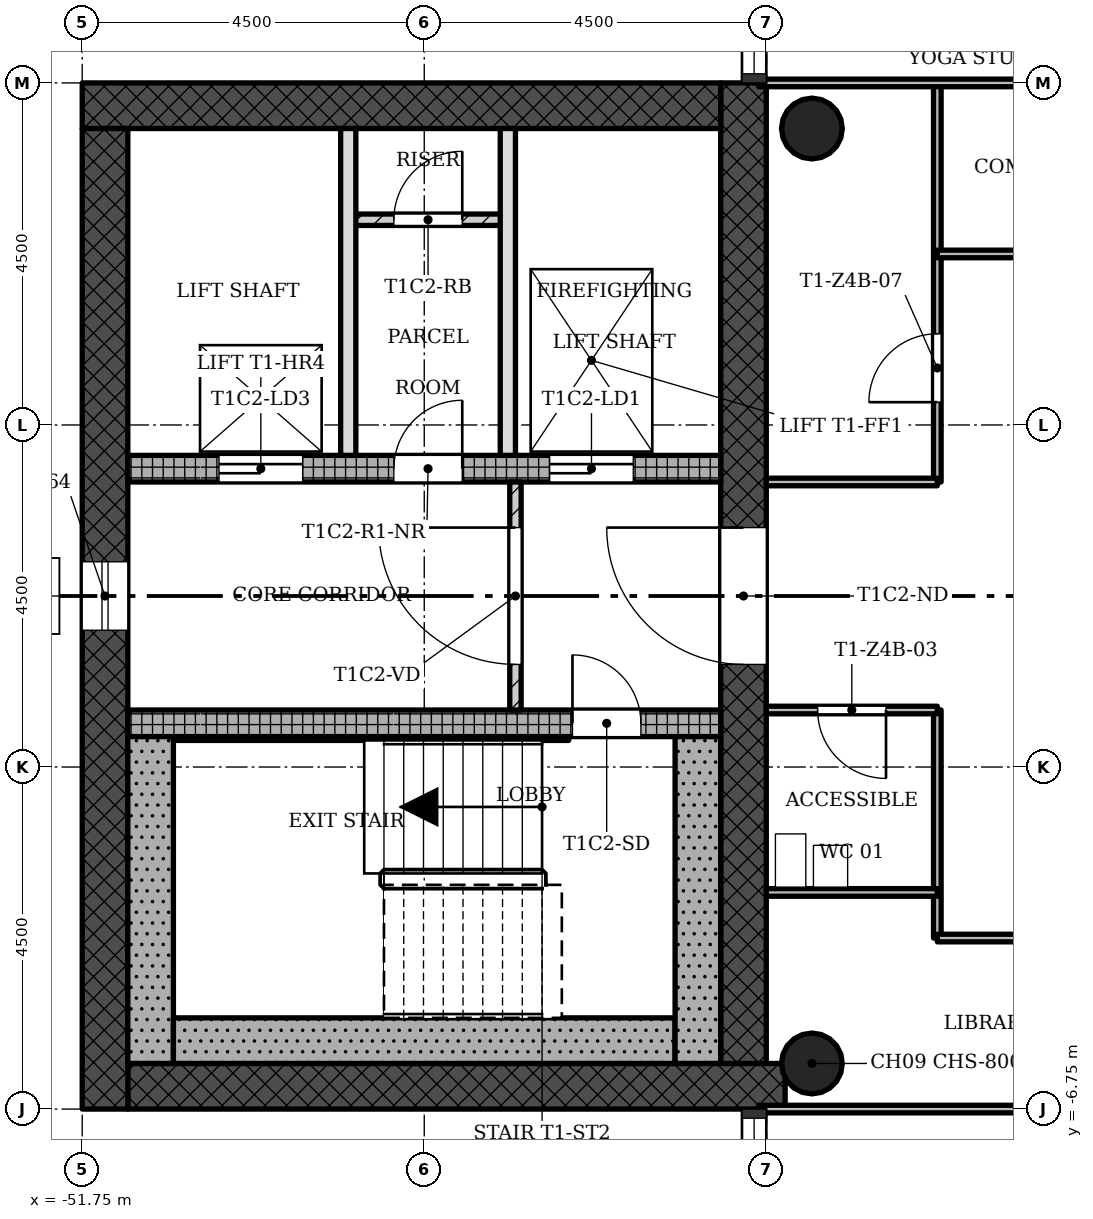
"""IFC4 building model, lengths in metres.
Left out: names, types, materials, properties, quantities, classifications, styles, units other than length and angle.
Written with IfcOpenShell. Run it as: python <this file> out.ifc"""

import sys

from ifc_helpers import new_model, si_unit, direction, frame, frame_2d, origin, origin_2d, place, context, subcontext, project, spatial, rectangle, hollow_circle, extrude, element, fill, save


model = new_model("IFC4")
c1 = context("Model", 3, precision=1e-05, world=origin(), true_north=direction((0.0, 1.0)))
c2 = subcontext(c1, "Body", "Model", "MODEL_VIEW")
j1 = project(units=[si_unit("LENGTHUNIT", "METRE"), si_unit("PLANEANGLEUNIT", "RADIAN")], contexts=[c1])
p1 = place(None, origin())
s1 = spatial("IfcSite", under=j1, at=p1, CompositionType="ELEMENT")
p2 = place(p1, origin())
s2 = spatial("IfcBuilding", under=s1, at=p2, CompositionType="ELEMENT")
p3 = place(p2, frame((0.0, 0.0, 230.0)))
s3 = spatial("IfcBuildingStorey", under=s2, at=p3, CompositionType="ELEMENT", Elevation=230.0)
p4 = place(p3, frame((-51.15, -6.45, 0.0), z_axis=(0.0, 0.0, 1.0), x_axis=(1.0, 0.0, 0.0)))
e1 = element("IfcWall", 1, at=p4, inside=s3, PredefinedType="SHEAR", context=c2, shape_type="SweptSolid", body=[
    extrude(rectangle(XDim=8.648, YDim=0.6, at=frame_2d((4.324, 0.0))), origin(), (0.0, 0.0, 1.0), 3.4),
])
p5 = place(p3, frame((-43.05, -6.15, 0.0), z_axis=(0.0, 0.0, 1.0), x_axis=(0.0, 1.0, 0.0)))
e2 = element("IfcWall", 2, at=p5, inside=s3, PredefinedType="SHEAR", context=c2, shape_type="SweptSolid", body=[
    extrude(rectangle(XDim=12.9, YDim=0.6, at=frame_2d((6.45, 0.0))), origin(), (0.0, 0.0, 1.0), 3.4),
])
p6 = place(p5, frame((5.25, 0.0, 0.0)))
e3 = element("IfcOpeningElement", 3, at=p6, cuts=e2, PredefinedType="OPENING", context=c2, shape_type="SweptSolid", body=[
    extrude(rectangle(XDim=1.8, YDim=2.1, at=frame_2d((0.9, 1.05))), frame((0.0, 0.31, 0.0), z_axis=(0.0, -1.0, 0.0), x_axis=(1.0, 0.0, 0.0)), (0.0, 0.0, 1.0), 0.62),
])
p7 = place(p3, frame((-43.35, 6.45, 0.0), z_axis=(0.0, 0.0, 1.0), x_axis=(-1.0, 0.0, 0.0)))
e4 = element("IfcWall", 4, at=p7, inside=s3, PredefinedType="SHEAR", context=c2, shape_type="SweptSolid", body=[
    extrude(rectangle(XDim=8.4, YDim=0.6, at=frame_2d((4.2, 0.0))), origin(), (0.0, 0.0, 1.0), 3.4),
])
p8 = place(p3, frame((-51.45, 6.15, 0.0), z_axis=(0.0, 0.0, 1.0), x_axis=(0.0, -1.0, 0.0)))
e5 = element("IfcWall", 5, at=p8, inside=s3, PredefinedType="SHEAR", context=c2, shape_type="SweptSolid", body=[
    extrude(rectangle(XDim=12.9, YDim=0.6, at=frame_2d((6.45, 0.0))), origin(), (0.0, 0.0, 1.0), 3.4),
])
p9 = place(p8, frame((5.7, 0.0, 0.45)))
e6 = element("IfcOpeningElement", 6, at=p9, cuts=e5, PredefinedType="OPENING", context=c2, shape_type="SweptSolid", body=[
    extrude(rectangle(XDim=0.9, YDim=2.4, at=frame_2d((0.45, 1.2))), frame((0.0, 0.31, 0.0), z_axis=(0.0, -1.0, 0.0), x_axis=(1.0, 0.0, 0.0)), (0.0, 0.0, 1.0), 0.62),
])
p10 = place(p3, frame((-51.15, -1.675, 0.0), z_axis=(0.0, 0.0, 1.0), x_axis=(1.0, 0.0, 0.0)))
e7 = element("IfcWall", 7, at=p10, inside=s3, PredefinedType="SHEAR", context=c2, shape_type="SweptSolid", body=[
    extrude(rectangle(XDim=7.8, YDim=0.35, at=frame_2d((3.9, 0.0))), origin(), (0.0, 0.0, 1.0), 3.4),
])
p11 = place(p10, frame((5.85, 0.0, 0.0)))
e8 = element("IfcOpeningElement", 8, at=p11, cuts=e7, PredefinedType="OPENING", context=c2, shape_type="SweptSolid", body=[
    extrude(rectangle(XDim=0.9, YDim=2.1, at=frame_2d((0.45, 1.05))), frame((0.0, 0.185, 0.0), z_axis=(0.0, -1.0, 0.0), x_axis=(1.0, 0.0, 0.0)), (0.0, 0.0, 1.0), 0.37),
])
p12 = place(p3, frame((-51.15, 1.675, 0.0), z_axis=(0.0, 0.0, 1.0), x_axis=(1.0, 0.0, 0.0)))
e9 = element("IfcWall", 9, at=p12, inside=s3, PredefinedType="SHEAR", context=c2, shape_type="SweptSolid", body=[
    extrude(rectangle(XDim=7.8, YDim=0.35, at=frame_2d((3.9, 0.0))), origin(), (0.0, 0.0, 1.0), 3.4),
])
p13 = place(p12, frame((5.55, 0.0, 0.0)))
e10 = element("IfcOpeningElement", 10, at=p13, cuts=e9, PredefinedType="OPENING", context=c2, shape_type="SweptSolid", body=[
    extrude(rectangle(XDim=1.1, YDim=2.1, at=frame_2d((0.55, 1.05))), frame((0.0, 0.185, 0.0), z_axis=(0.0, -1.0, 0.0), x_axis=(1.0, 0.0, 0.0)), (0.0, 0.0, 1.0), 0.37),
])
p14 = place(p12, frame((1.2, 0.0, 0.0)))
e11 = element("IfcOpeningElement", 11, at=p14, cuts=e9, PredefinedType="OPENING", context=c2, shape_type="SweptSolid", body=[
    extrude(rectangle(XDim=1.1, YDim=2.1, at=frame_2d((0.55, 1.05))), frame((0.0, 0.185, 0.0), z_axis=(0.0, -1.0, 0.0), x_axis=(1.0, 0.0, 0.0)), (0.0, 0.0, 1.0), 0.37),
])
p15 = place(p12, frame((3.5, 0.0, 0.0)))
e12 = element("IfcOpeningElement", 12, at=p15, cuts=e9, PredefinedType="OPENING", context=c2, shape_type="SweptSolid", body=[
    extrude(rectangle(XDim=0.9, YDim=2.1, at=frame_2d((0.45, 1.05))), frame((0.0, 0.185, 0.0), z_axis=(0.0, -1.0, 0.0), x_axis=(1.0, 0.0, 0.0)), (0.0, 0.0, 1.0), 0.37),
])
for number, where, z_axis, x_axis in (
    (13, (-42.15, -6.15, 0.0), (0.0, 0.0, 1.0), (1.0, 0.0, 0.0)),
    (14, (-42.15, 6.15, 0.0), (0.0, 0.0, 1.0), (1.0, 0.0, 0.0)),
):
    element("IfcColumn", number, at=place(p3, frame(where, z_axis=z_axis, x_axis=x_axis)), inside=s3, PredefinedType="COLUMN", context=c2, shape_type="SweptSolid", body=[
        extrude(hollow_circle(Radius=0.4, WallThickness=0.028, at=origin_2d()), origin(), (0.0, 0.0, 1.0), 3.4),
    ])
p16 = place(p3, frame((-46.05, 1.5, 0.0), z_axis=(0.0, 0.0, 1.0), x_axis=(0.0, -1.0, 0.0)))
e15 = element("IfcWall", 15, at=p16, inside=s3, PredefinedType="PARTITIONING", context=c2, shape_type="SweptSolid", body=[
    extrude(rectangle(XDim=3.0, YDim=0.15, at=frame_2d((1.5, 0.0))), origin(), (0.0, 0.0, 1.0), 2.98),
])
p17 = place(p16, frame((0.6, 0.0, 0.0)))
e16 = element("IfcOpeningElement", 16, at=p17, cuts=e15, PredefinedType="OPENING", context=c2, shape_type="SweptSolid", body=[
    extrude(rectangle(XDim=1.8, YDim=2.1, at=frame_2d((0.9, 1.05))), frame((0.0, 0.085, 0.0), z_axis=(0.0, -1.0, 0.0), x_axis=(1.0, 0.0, 0.0)), (0.0, 0.0, 1.0), 0.17),
])
for number, where, z_axis, x_axis in (
    (17, (-48.25, 6.15, 0.0), (0.0, 0.0, 1.0), (0.0, -1.0, 0.0)),
    (18, (-46.15, 6.15, 0.0), (0.0, 0.0, 1.0), (0.0, -1.0, 0.0)),
):
    element("IfcWall", number, at=place(p3, frame(where, z_axis=z_axis, x_axis=x_axis)), inside=s3, PredefinedType="SOLIDWALL", context=c2, shape_type="SweptSolid", body=[
        extrude(rectangle(XDim=4.3, YDim=0.2, at=frame_2d((2.15, 0.0))), origin(), (0.0, 0.0, 1.0), 2.98),
    ])
p18 = place(p3, frame((-46.15, 4.95, 0.0), z_axis=(0.0, 0.0, 1.0), x_axis=(-1.0, 0.0, 0.0)))
e19 = element("IfcWall", 19, at=p18, inside=s3, PredefinedType="PARTITIONING", context=c2, shape_type="SweptSolid", body=[
    extrude(rectangle(XDim=2.1, YDim=0.15, at=frame_2d((1.05, 0.0))), origin(), (0.0, 0.0, 1.0), 2.98),
])
p19 = place(p18, frame((0.6, 0.0, 0.0)))
e20 = element("IfcOpeningElement", 20, at=p19, cuts=e19, PredefinedType="OPENING", context=c2, shape_type="SweptSolid", body=[
    extrude(rectangle(XDim=0.9, YDim=2.1, at=frame_2d((0.45, 1.05))), frame((0.0, 0.085, 0.0), z_axis=(0.0, -1.0, 0.0), x_axis=(1.0, 0.0, 0.0)), (0.0, 0.0, 1.0), 0.17),
])
p20 = place(p3, frame((-40.5, -4.5, 0.0), z_axis=(0.0, 0.0, 1.0), x_axis=(0.0, 1.0, 0.0)))
e21 = element("IfcWall", 21, at=p20, inside=s3, PredefinedType="PARTITIONING", context=c2, shape_type="SweptSolid", body=[
    extrude(rectangle(XDim=3.0, YDim=0.1, at=frame_2d((1.5, 0.0))), origin(), (0.0, 0.0, 1.0), 2.98),
])
p21 = place(p3, frame((-40.5, 1.5, 0.0), z_axis=(0.0, 0.0, 1.0), x_axis=(0.0, 1.0, 0.0)))
e22 = element("IfcWall", 22, at=p21, inside=s3, PredefinedType="PARTITIONING", context=c2, shape_type="SweptSolid", body=[
    extrude(rectangle(XDim=5.25, YDim=0.1, at=frame_2d((2.625, 0.0))), origin(), (0.0, 0.0, 1.0), 2.98),
])
p22 = place(p21, frame((1.05, 0.0, 0.0)))
e23 = element("IfcOpeningElement", 23, at=p22, cuts=e22, PredefinedType="OPENING", context=c2, shape_type="SweptSolid", body=[
    extrude(rectangle(XDim=0.9, YDim=2.1, at=frame_2d((0.45, 1.05))), frame((0.0, 0.06, 0.0), z_axis=(0.0, -1.0, 0.0), x_axis=(1.0, 0.0, 0.0)), (0.0, 0.0, 1.0), 0.12),
])
p23 = place(p3, frame((-42.85, -6.75, 0.0), z_axis=(0.0, 0.0, 1.0), x_axis=(1.0, 0.0, 0.0)))
e24 = element("IfcWall", 24, at=p23, inside=s3, PredefinedType="PARTITIONING", context=c2, shape_type="SweptSolid", body=[
    extrude(rectangle(XDim=5.95, YDim=0.1, at=frame_2d((2.975, 0.0))), origin(), (0.0, 0.0, 1.0), 2.98),
])
p24 = place(p3, frame((-40.5, -4.5, 0.0), z_axis=(0.0, 0.0, 1.0), x_axis=(1.0, 0.0, 0.0)))
e25 = element("IfcWall", 25, at=p24, inside=s3, PredefinedType="PARTITIONING", context=c2, shape_type="SweptSolid", body=[
    extrude(rectangle(XDim=3.6, YDim=0.1, at=frame_2d((1.8, 0.0))), origin(), (0.0, 0.0, 1.0), 2.98),
])
p25 = place(p24, frame((1.35, 0.0, 0.0)))
e26 = element("IfcOpeningElement", 26, at=p25, cuts=e25, PredefinedType="OPENING", context=c2, shape_type="SweptSolid", body=[
    extrude(rectangle(XDim=0.9, YDim=2.1, at=frame_2d((0.45, 1.05))), frame((0.0, 0.06, 0.0), z_axis=(0.0, -1.0, 0.0), x_axis=(1.0, 0.0, 0.0)), (0.0, 0.0, 1.0), 0.12),
])
p26 = place(p3, frame((-42.75, -3.9, 0.0), z_axis=(0.0, 0.0, 1.0), x_axis=(1.0, 0.0, 0.0)))
e27 = element("IfcWall", 27, at=p26, inside=s3, PredefinedType="PARTITIONING", context=c2, shape_type="SweptSolid", body=[
    extrude(rectangle(XDim=2.25, YDim=0.1, at=frame_2d((1.125, 0.0))), origin(), (0.0, 0.0, 1.0), 2.98),
])
p27 = place(p3, frame((-42.75, -1.5, 0.0), z_axis=(0.0, 0.0, 1.0), x_axis=(1.0, 0.0, 0.0)))
e28 = element("IfcWall", 28, at=p27, inside=s3, PredefinedType="PARTITIONING", context=c2, shape_type="SweptSolid", body=[
    extrude(rectangle(XDim=2.25, YDim=0.1, at=frame_2d((1.125, 0.0))), origin(), (0.0, 0.0, 1.0), 2.98),
])
p28 = place(p27, frame((0.675, 0.0, 0.0)))
e29 = element("IfcOpeningElement", 29, at=p28, cuts=e28, PredefinedType="OPENING", context=c2, shape_type="SweptSolid", body=[
    extrude(rectangle(XDim=0.9, YDim=2.1, at=frame_2d((0.45, 1.05))), frame((0.0, 0.06, 0.0), z_axis=(0.0, -1.0, 0.0), x_axis=(1.0, 0.0, 0.0)), (0.0, 0.0, 1.0), 0.12),
])
p29 = place(p3, frame((-42.75, 1.5, 0.0), z_axis=(0.0, 0.0, 1.0), x_axis=(1.0, 0.0, 0.0)))
e30 = element("IfcWall", 30, at=p29, inside=s3, PredefinedType="PARTITIONING", context=c2, shape_type="SweptSolid", body=[
    extrude(rectangle(XDim=2.25, YDim=0.1, at=frame_2d((1.125, 0.0))), origin(), (0.0, 0.0, 1.0), 2.98),
])
p30 = place(p3, frame((-40.5, 4.5, 0.0), z_axis=(0.0, 0.0, 1.0), x_axis=(1.0, 0.0, 0.0)))
e31 = element("IfcWall", 31, at=p30, inside=s3, PredefinedType="PARTITIONING", context=c2, shape_type="SweptSolid", body=[
    extrude(rectangle(XDim=3.6, YDim=0.1, at=frame_2d((1.8, 0.0))), origin(), (0.0, 0.0, 1.0), 2.98),
])
p31 = place(p30, frame((1.35, 0.0, 0.0)))
e32 = element("IfcOpeningElement", 32, at=p31, cuts=e31, PredefinedType="OPENING", context=c2, shape_type="SweptSolid", body=[
    extrude(rectangle(XDim=0.9, YDim=2.1, at=frame_2d((0.45, 1.05))), frame((0.0, 0.06, 0.0), z_axis=(0.0, -1.0, 0.0), x_axis=(1.0, 0.0, 0.0)), (0.0, 0.0, 1.0), 0.12),
])
p32 = place(p3, frame((-42.85, 6.75, 0.0), z_axis=(0.0, 0.0, 1.0), x_axis=(1.0, 0.0, 0.0)))
e33 = element("IfcWall", 33, at=p32, inside=s3, PredefinedType="PARTITIONING", context=c2, shape_type="SweptSolid", body=[
    extrude(rectangle(XDim=5.95, YDim=0.1, at=frame_2d((2.975, 0.0))), origin(), (0.0, 0.0, 1.0), 2.98),
])
p33 = place(p3, frame((-50.85, -1.85, 0.0), z_axis=(0.0, 0.0, 1.0), x_axis=(0.0, -1.0, 0.0)))
e34 = element("IfcWall", 34, at=p33, inside=s3, PredefinedType="SHEAR", context=c2, shape_type="SweptSolid", body=[
    extrude(rectangle(XDim=4.3, YDim=0.6, at=frame_2d((2.15, 0.0))), origin(), (0.0, 0.0, 1.0), 3.4),
])
p34 = place(p3, frame((-43.95, -5.85, 0.0), z_axis=(0.0, 0.0, 1.0), x_axis=(-1.0, 0.0, 0.0)))
e35 = element("IfcWall", 35, at=p34, inside=s3, PredefinedType="SHEAR", context=c2, shape_type="SweptSolid", body=[
    extrude(rectangle(XDim=6.6, YDim=0.6, at=frame_2d((3.3, 0.0))), origin(), (0.0, 0.0, 1.0), 3.4),
])
p35 = place(p3, frame((-43.65, -1.85, 0.0), z_axis=(0.0, 0.0, 1.0), x_axis=(0.0, -1.0, 0.0)))
e36 = element("IfcWall", 36, at=p35, inside=s3, PredefinedType="SHEAR", context=c2, shape_type="SweptSolid", body=[
    extrude(rectangle(XDim=4.3, YDim=0.6, at=frame_2d((2.15, 0.0))), origin(), (0.0, 0.0, 1.0), 3.4),
])
p36 = place(p3, frame((-45.35, -1.875, 0.0), z_axis=(0.0, 0.0, 1.0), x_axis=(-1.0, 0.0, 0.0)))
e37 = element("IfcWall", 37, at=p36, inside=s3, PredefinedType="SHEAR", context=c2, shape_type="SweptSolid", body=[
    extrude(rectangle(XDim=5.2, YDim=0.05, at=frame_2d((2.6, 0.0))), origin(), (0.0, 0.0, 1.0), 3.4),
])
p37 = place(p9, origin())
e38 = element("IfcWindow", 38, at=p37, inside=s3, PartitioningType="SINGLE_PANEL", PredefinedType="WINDOW", context=c2, shape_type="SweptSolid", body=[
    extrude(rectangle(XDim=0.9, YDim=2.4, at=frame_2d((0.45, 1.2))), frame((0.0, 0.03, 0.0), z_axis=(0.0, -1.0, 0.0), x_axis=(1.0, 0.0, 0.0)), (0.0, 0.0, 1.0), 0.06),
])
fill(e6, e38)
p38 = place(p17, origin())
e39 = element("IfcDoor", 39, at=p38, inside=s3, OperationType="SINGLE_SWING_LEFT", PredefinedType="DOOR", context=c2, shape_type="SweptSolid", body=[
    extrude(rectangle(XDim=1.8, YDim=2.1, at=frame_2d((0.9, 1.05))), frame((0.0, 0.025, 0.0), z_axis=(0.0, -1.0, 0.0), x_axis=(1.0, 0.0, 0.0)), (0.0, 0.0, 1.0), 0.05),
])
fill(e16, e39)
p39 = place(p19, origin())
e40 = element("IfcDoor", 40, at=p39, inside=s3, OperationType="SINGLE_SWING_LEFT", PredefinedType="DOOR", context=c2, shape_type="SweptSolid", body=[
    extrude(rectangle(XDim=0.9, YDim=2.1, at=frame_2d((0.45, 1.05))), frame((0.0, 0.025, 0.0), z_axis=(0.0, -1.0, 0.0), x_axis=(1.0, 0.0, 0.0)), (0.0, 0.0, 1.0), 0.05),
])
fill(e20, e40)
p40 = place(p28, origin())
e41 = element("IfcDoor", 41, at=p40, inside=s3, OperationType="SINGLE_SWING_RIGHT", PredefinedType="DOOR", context=c2, shape_type="SweptSolid", body=[
    extrude(rectangle(XDim=0.9, YDim=2.1, at=frame_2d((0.45, 1.05))), frame((0.0, 0.025, 0.0), z_axis=(0.0, -1.0, 0.0), x_axis=(1.0, 0.0, 0.0)), (0.0, 0.0, 1.0), 0.05),
])
fill(e29, e41)
p41 = place(p22, origin())
e42 = element("IfcDoor", 42, at=p41, inside=s3, OperationType="SINGLE_SWING_RIGHT", PredefinedType="DOOR", context=c2, shape_type="SweptSolid", body=[
    extrude(rectangle(XDim=0.9, YDim=2.1, at=frame_2d((0.45, 1.05))), frame((0.0, 0.025, 0.0), z_axis=(0.0, -1.0, 0.0), x_axis=(1.0, 0.0, 0.0)), (0.0, 0.0, 1.0), 0.05),
])
fill(e23, e42)
p42 = place(p11, origin())
e43 = element("IfcDoor", 43, at=p42, inside=s3, OperationType="SINGLE_SWING_RIGHT", PredefinedType="DOOR", context=c2, shape_type="SweptSolid", body=[
    extrude(rectangle(XDim=0.9, YDim=2.1, at=frame_2d((0.45, 1.05))), frame((0.0, 0.025, 0.0), z_axis=(0.0, -1.0, 0.0), x_axis=(1.0, 0.0, 0.0)), (0.0, 0.0, 1.0), 0.05),
])
fill(e8, e43)
p43 = place(p13, origin())
e44 = element("IfcDoor", 44, at=p43, inside=s3, OperationType="SLIDING_TO_LEFT", PredefinedType="DOOR", context=c2, shape_type="SweptSolid", body=[
    extrude(rectangle(XDim=1.1, YDim=2.1, at=frame_2d((0.55, 1.05))), frame((0.0, 0.025, 0.0), z_axis=(0.0, -1.0, 0.0), x_axis=(1.0, 0.0, 0.0)), (0.0, 0.0, 1.0), 0.05),
])
fill(e10, e44)
p44 = place(p14, origin())
e45 = element("IfcDoor", 45, at=p44, inside=s3, OperationType="SLIDING_TO_LEFT", PredefinedType="DOOR", context=c2, shape_type="SweptSolid", body=[
    extrude(rectangle(XDim=1.1, YDim=2.1, at=frame_2d((0.55, 1.05))), frame((0.0, 0.025, 0.0), z_axis=(0.0, -1.0, 0.0), x_axis=(1.0, 0.0, 0.0)), (0.0, 0.0, 1.0), 0.05),
])
fill(e11, e45)
p45 = place(p15, origin())
e46 = element("IfcDoor", 46, at=p45, inside=s3, OperationType="SINGLE_SWING_LEFT", PredefinedType="DOOR", context=c2, shape_type="SweptSolid", body=[
    extrude(rectangle(XDim=0.9, YDim=2.1, at=frame_2d((0.45, 1.05))), frame((0.0, 0.025, 0.0), z_axis=(0.0, -1.0, 0.0), x_axis=(1.0, 0.0, 0.0)), (0.0, 0.0, 1.0), 0.05),
])
fill(e12, e46)
p46 = place(p6, origin())
e47 = element("IfcDoor", 47, at=p46, inside=s3, OperationType="SINGLE_SWING_LEFT", PredefinedType="DOOR", context=c2, shape_type="SweptSolid", body=[
    extrude(rectangle(XDim=1.8, YDim=2.1, at=frame_2d((0.9, 1.05))), frame((0.0, 0.025, 0.0), z_axis=(0.0, -1.0, 0.0), x_axis=(1.0, 0.0, 0.0)), (0.0, 0.0, 1.0), 0.05),
])
fill(e3, e47)
save(model, sys.argv[1])
